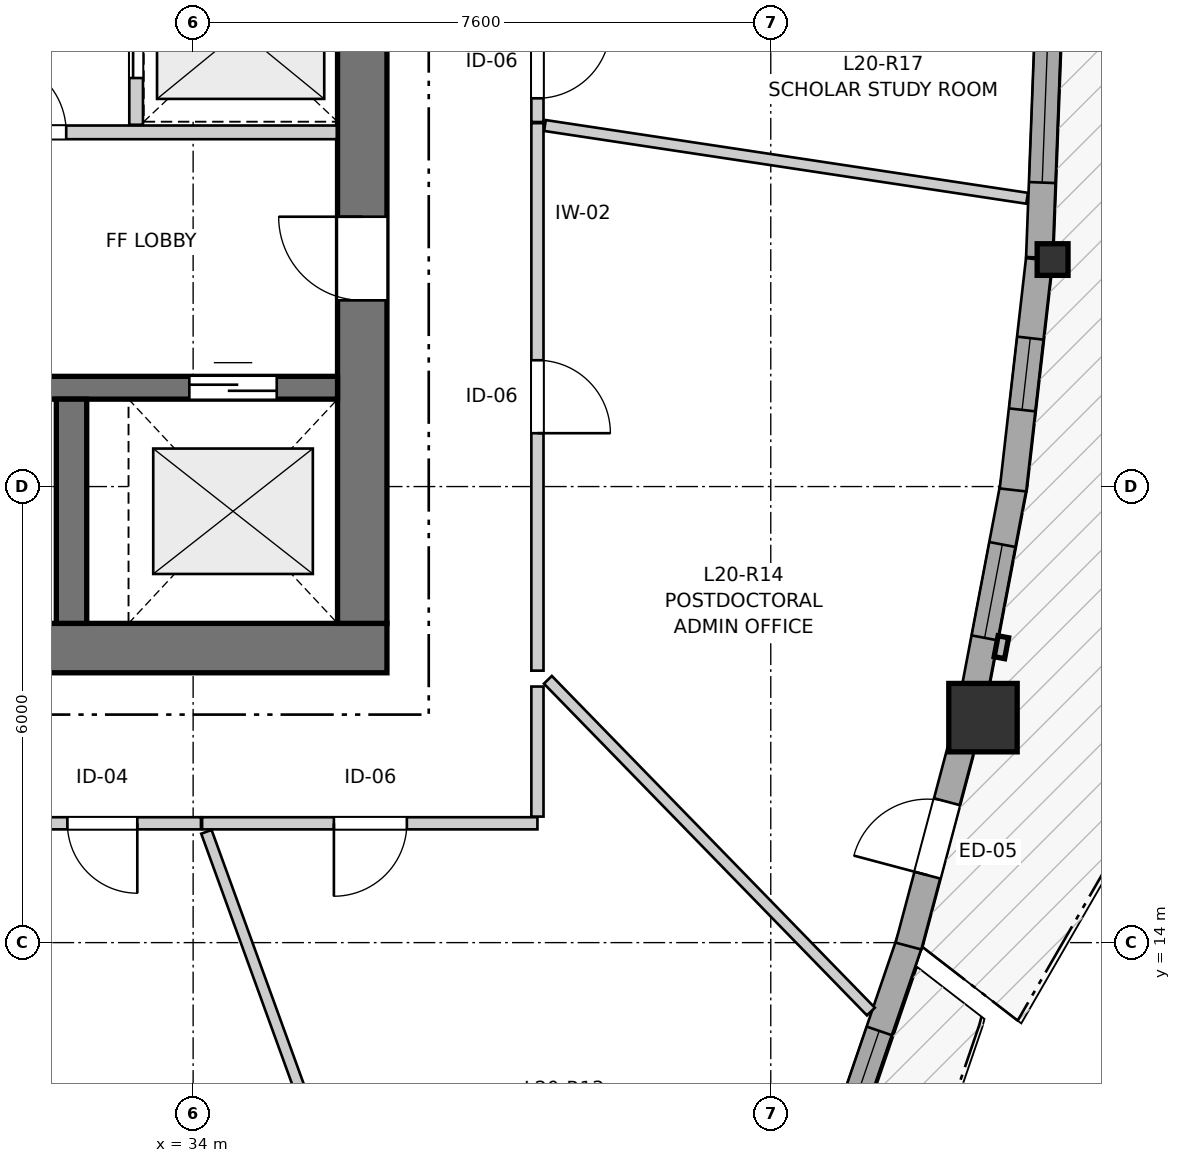
"""IFC4 building model, lengths in metres.
Left out: names, types, materials, properties, quantities, classifications, styles, units other than length and angle.
Written with IfcOpenShell. Run it as: python <this file> out.ifc"""

import sys

from ifc_helpers import new_model, si_unit, direction, frame, frame_2d, origin, origin_2d, place, context, subcontext, project, spatial, rectangle, i_section, extrude, source, transform, mapped, element, fill, save


model = new_model("IFC4")
c1 = context("Model", 3, precision=1e-05, world=origin(), true_north=direction((0.0, 1.0)))
c2 = subcontext(c1, "Body", "Model", "MODEL_VIEW")
j1 = project(units=[si_unit("LENGTHUNIT", "METRE"), si_unit("PLANEANGLEUNIT", "RADIAN")], contexts=[c1])
p1 = place(None, origin())
s1 = spatial("IfcSite", under=j1, at=p1, CompositionType="ELEMENT")
p2 = place(p1, origin())
s2 = spatial("IfcBuilding", under=s1, at=p2, CompositionType="ELEMENT")
p3 = place(p2, frame((0.0, 0.0, 70.4)))
s3 = spatial("IfcBuildingStorey", under=s2, at=p3, CompositionType="ELEMENT", Elevation=70.4)
p4 = place(p3, frame((24.15, 17.875, 0.0), z_axis=(0.0, 0.0, 1.0), x_axis=(1.0, 0.0, 0.0)))
e1 = element("IfcWall", 1, at=p4, inside=s3, PredefinedType="SHEAR", context=c2, shape_type="SweptSolid", body=[
    extrude(rectangle(XDim=12.4, YDim=0.65, at=frame_2d((6.2, 0.0))), origin(), (0.0, 0.0, 1.0), 2.95),
])
p5 = place(p3, frame((36.225, 18.2, 0.0), z_axis=(0.0, 0.0, 1.0), x_axis=(0.0, 1.0, 0.0)))
e2 = element("IfcWall", 2, at=p5, inside=s3, PredefinedType="SHEAR", context=c2, shape_type="SweptSolid", body=[
    extrude(rectangle(XDim=15.6, YDim=0.65, at=frame_2d((7.8, 0.0))), origin(), (0.0, 0.0, 1.0), 2.95),
])
p6 = place(p5, frame((4.25, 0.0, 0.0)))
e3 = element("IfcOpeningElement", 3, at=p6, cuts=e2, PredefinedType="OPENING", context=c2, shape_type="SweptSolid", body=[
    extrude(rectangle(XDim=1.1, YDim=2.15, at=frame_2d((0.55, 1.075))), frame((0.0, 0.335, 0.0), z_axis=(0.0, -1.0, 0.0), x_axis=(1.0, 0.0, 0.0)), (0.0, 0.0, 1.0), 0.67),
])
p7 = place(p5, frame((10.25, 0.0, 0.0)))
e4 = element("IfcOpeningElement", 4, at=p7, cuts=e2, PredefinedType="OPENING", context=c2, shape_type="SweptSolid", body=[
    extrude(rectangle(XDim=1.1, YDim=2.15, at=frame_2d((0.55, 1.075))), frame((0.0, 0.335, 0.0), z_axis=(0.0, -1.0, 0.0), x_axis=(1.0, 0.0, 0.0)), (0.0, 0.0, 1.0), 0.67),
])
p8 = place(p3, frame((24.8, 21.3, 0.0), z_axis=(0.0, 0.0, 1.0), x_axis=(1.0, 0.0, 0.0)))
e5 = element("IfcWall", 5, at=p8, inside=s3, PredefinedType="SHEAR", context=c2, shape_type="SweptSolid", body=[
    extrude(rectangle(XDim=11.1, YDim=0.3, at=frame_2d((5.55, 0.0))), origin(), (0.0, 0.0, 1.0), 2.95),
])
p9 = place(p8, frame((6.22, 0.0, 0.0)))
e6 = element("IfcOpeningElement", 6, at=p9, cuts=e5, PredefinedType="OPENING", context=c2, shape_type="SweptSolid", body=[
    extrude(rectangle(XDim=0.98, YDim=2.15, at=frame_2d((0.49, 1.075))), frame((0.0, 0.16, 0.0), z_axis=(0.0, -1.0, 0.0), x_axis=(1.0, 0.0, 0.0)), (0.0, 0.0, 1.0), 0.32),
])
p10 = place(p8, frame((9.15, 0.0, 0.0)))
e7 = element("IfcOpeningElement", 7, at=p10, cuts=e5, PredefinedType="OPENING", context=c2, shape_type="SweptSolid", body=[
    extrude(rectangle(XDim=1.15, YDim=2.15, at=frame_2d((0.575, 1.075))), frame((0.0, 0.16, 0.0), z_axis=(0.0, -1.0, 0.0), x_axis=(1.0, 0.0, 0.0)), (0.0, 0.0, 1.0), 0.32),
])
p11 = place(p3, frame((32.4, 18.2, 0.0), z_axis=(0.0, 0.0, 1.0), x_axis=(0.0, 1.0, 0.0)))
e8 = element("IfcWall", 8, at=p11, inside=s3, PredefinedType="SHEAR", context=c2, shape_type="SweptSolid", body=[
    extrude(rectangle(XDim=2.95, YDim=0.4, at=frame_2d((1.475, 0.0))), origin(), (0.0, 0.0, 1.0), 2.95),
])
m1 = source(origin(), c2, "Body", "SweptSolid", [
    extrude(rectangle(XDim=0.9, YDim=0.9, at=origin_2d()), origin(), (0.0, 0.0, 1.0), 2.95),
])
p12 = place(p3, frame((44.392, 16.96, 0.0), z_axis=(0.0, 0.0, 1.0), x_axis=(1.0, 0.0, 0.0)))
e9 = element("IfcColumn", 9, at=p12, inside=s3, PredefinedType="COLUMN", context=c2, shape_type="MappedRepresentation", body=[
    mapped(m1, transform((0.0, 0.0, 0.0), x_axis=(1.0, 0.0, 0.0), y_axis=(0.0, 1.0, 0.0), z_axis=(0.0, 0.0, 1.0), scale=1.0)),
])
m2 = source(origin(), c2, "Body", "SweptSolid", [
    extrude(i_section(OverallWidth=0.406, OverallDepth=0.416, WebThickness=0.027, FlangeThickness=0.044, FilletRadius=0.015, at=origin_2d()), origin(), (0.0, 0.0, 1.0), 2.95),
])
p13 = place(p3, frame((45.308, 22.987, 0.0), z_axis=(0.0, 0.0, 1.0), x_axis=(1.0, 0.0, 0.0)))
e10 = element("IfcColumn", 10, at=p13, inside=s3, PredefinedType="PILASTER", context=c2, shape_type="MappedRepresentation", body=[
    mapped(m2, transform((0.0, 0.0, 0.0), x_axis=(1.0, 0.0, 0.0), y_axis=(0.0, 1.0, 0.0), z_axis=(0.0, 0.0, 1.0), scale=1.0)),
])
p14 = place(p3, frame((42.401, 11.009, 0.0), z_axis=(0.0, 0.0, 1.0), x_axis=(0.323605065536, 0.946192243447, 0.0)))
e11 = element("IfcWall", 11, at=p14, inside=s3, PredefinedType="SOLIDWALL", context=c2, shape_type="SweptSolid", body=[
    extrude(rectangle(XDim=3.203, YDim=0.35, at=frame_2d((1.601, 0.0))), origin(), (0.0, 0.0, 1.0), 2.48),
])
p15 = place(p14, frame((0.334, 0.0, 0.82)))
e12 = element("IfcOpeningElement", 12, at=p15, cuts=e11, PredefinedType="OPENING", context=c2, shape_type="SweptSolid", body=[
    extrude(rectangle(XDim=1.6, YDim=1.35, at=frame_2d((0.8, 0.675))), frame((0.0, 0.185, 0.0), z_axis=(0.0, -1.0, 0.0), x_axis=(1.0, 0.0, 0.0)), (0.0, 0.0, 1.0), 0.37),
])
p16 = place(p3, frame((43.412, 13.955, 0.0), z_axis=(0.0, 0.0, 1.0), x_axis=(0.257050841376, 0.966397881283, 0.0)))
e13 = element("IfcWall", 13, at=p16, inside=s3, PredefinedType="SOLIDWALL", context=c2, shape_type="SweptSolid", body=[
    extrude(rectangle(XDim=2.931, YDim=0.35, at=frame_2d((1.465, 0.0))), origin(), (0.0, 0.0, 1.0), 2.48),
])
p17 = place(p16, frame((0.966, 0.0, 0.0)))
e14 = element("IfcOpeningElement", 14, at=p17, cuts=e13, PredefinedType="OPENING", context=c2, shape_type="SweptSolid", body=[
    extrude(rectangle(XDim=1.0, YDim=2.1, at=frame_2d((0.5, 1.05))), frame((0.0, 0.185, 0.0), z_axis=(0.0, -1.0, 0.0), x_axis=(1.0, 0.0, 0.0)), (0.0, 0.0, 1.0), 0.37),
])
p18 = place(p3, frame((44.262, 17.214, 0.0), z_axis=(0.0, 0.0, 1.0), x_axis=(0.18665246466, 0.982426006087, 0.0)))
e15 = element("IfcWall", 15, at=p18, inside=s3, PredefinedType="SOLIDWALL", context=c2, shape_type="SweptSolid", body=[
    extrude(rectangle(XDim=2.88, YDim=0.35, at=frame_2d((1.44, 0.0))), origin(), (0.0, 0.0, 1.0), 2.48),
])
p19 = place(p18, frame((0.81, 0.0, 0.82)))
e16 = element("IfcOpeningElement", 16, at=p19, cuts=e15, PredefinedType="OPENING", context=c2, shape_type="SweptSolid", body=[
    extrude(rectangle(XDim=1.25, YDim=1.35, at=frame_2d((0.625, 0.675))), frame((0.0, 0.185, 0.0), z_axis=(0.0, -1.0, 0.0), x_axis=(1.0, 0.0, 0.0)), (0.0, 0.0, 1.0), 0.37),
])
p20 = place(p3, frame((44.787, 19.955, 0.0), z_axis=(0.0, 0.0, 1.0), x_axis=(0.113232876367, 0.993568475602, 0.0)))
e17 = element("IfcWall", 17, at=p20, inside=s3, PredefinedType="SOLIDWALL", context=c2, shape_type="SweptSolid", body=[
    extrude(rectangle(XDim=3.051, YDim=0.35, at=frame_2d((1.525, 0.0))), origin(), (0.0, 0.0, 1.0), 2.48),
])
p21 = place(p20, frame((1.06, 0.0, 0.82)))
e18 = element("IfcOpeningElement", 18, at=p21, cuts=e17, PredefinedType="OPENING", context=c2, shape_type="SweptSolid", body=[
    extrude(rectangle(XDim=0.95, YDim=1.35, at=frame_2d((0.475, 0.675))), frame((0.0, 0.185, 0.0), z_axis=(0.0, -1.0, 0.0), x_axis=(1.0, 0.0, 0.0)), (0.0, 0.0, 1.0), 0.37),
])
p22 = place(p3, frame((45.134, 23.013, 0.0), z_axis=(0.0, 0.0, 1.0), x_axis=(0.037984969205, 0.999278310639, 0.0)))
e19 = element("IfcWall", 19, at=p22, inside=s3, PredefinedType="SOLIDWALL", context=c2, shape_type="SweptSolid", body=[
    extrude(rectangle(XDim=3.034, YDim=0.35, at=frame_2d((1.517, 0.0))), origin(), (0.0, 0.0, 1.0), 2.48),
])
p23 = place(p22, frame((0.987, 0.0, 0.82)))
e20 = element("IfcOpeningElement", 20, at=p23, cuts=e19, PredefinedType="OPENING", context=c2, shape_type="SweptSolid", body=[
    extrude(rectangle(XDim=1.75, YDim=1.3, at=frame_2d((0.875, 0.65))), frame((0.0, 0.185, 0.0), z_axis=(0.0, -1.0, 0.0), x_axis=(1.0, 0.0, 0.0)), (0.0, 0.0, 1.0), 0.37),
])
p24 = place(p3, frame((30.67, 24.66, 0.0), z_axis=(0.0, 0.0, 1.0), x_axis=(1.0, 0.0, 0.0)))
e21 = element("IfcWall", 21, at=p24, inside=s3, PredefinedType="PARTITIONING", context=c2, shape_type="SweptSolid", body=[
    extrude(rectangle(XDim=5.22, YDim=0.18, at=frame_2d((2.61, 0.0))), origin(), (0.0, 0.0, 1.0), 2.95),
])
p25 = place(p24, frame((0.68, 0.0, 0.0)))
e22 = element("IfcOpeningElement", 22, at=p25, cuts=e21, PredefinedType="OPENING", context=c2, shape_type="SweptSolid", body=[
    extrude(rectangle(XDim=0.98, YDim=2.15, at=frame_2d((0.49, 1.075))), frame((0.0, 0.1, 0.0), z_axis=(0.0, -1.0, 0.0), x_axis=(1.0, 0.0, 0.0)), (0.0, 0.0, 1.0), 0.2),
])
p26 = place(p3, frame((33.25, 24.76, 0.0), z_axis=(0.0, 0.0, 1.0), x_axis=(0.0, 1.0, 0.0)))
e23 = element("IfcWall", 23, at=p26, inside=s3, PredefinedType="PARTITIONING", context=c2, shape_type="SweptSolid", body=[
    extrude(rectangle(XDim=2.48, YDim=0.18, at=frame_2d((1.24, 0.0))), origin(), (0.0, 0.0, 1.0), 2.95),
])
p27 = place(p26, frame((0.615, 0.0, 0.0)))
e24 = element("IfcOpeningElement", 24, at=p27, cuts=e23, PredefinedType="OPENING", context=c2, shape_type="SweptSolid", body=[
    extrude(rectangle(XDim=1.25, YDim=2.15, at=frame_2d((0.625, 1.075))), frame((0.0, 0.1, 0.0), z_axis=(0.0, -1.0, 0.0), x_axis=(1.0, 0.0, 0.0)), (0.0, 0.0, 1.0), 0.2),
])
p28 = place(p3, frame((38.53, 24.781, 0.0), z_axis=(0.0, 0.0, 1.0), x_axis=(0.0, -1.0, 0.0)))
e25 = element("IfcWall", 25, at=p28, inside=s3, PredefinedType="PARTITIONING", context=c2, shape_type="SweptSolid", body=[
    extrude(rectangle(XDim=7.203, YDim=0.16, at=frame_2d((3.602, 0.0))), origin(), (0.0, 0.0, 1.0), 2.95),
])
p29 = place(p28, frame((3.119, 0.0, 0.0)))
e26 = element("IfcOpeningElement", 26, at=p29, cuts=e25, PredefinedType="OPENING", context=c2, shape_type="SweptSolid", body=[
    extrude(rectangle(XDim=0.96, YDim=2.1, at=frame_2d((0.48, 1.05))), frame((0.0, 0.09, 0.0), z_axis=(0.0, -1.0, 0.0), x_axis=(1.0, 0.0, 0.0)), (0.0, 0.0, 1.0), 0.18),
])
p30 = place(p3, frame((38.53, 15.57, 0.0), z_axis=(0.0, 0.0, 1.0), x_axis=(-1.0, 0.0, 0.0)))
e27 = element("IfcWall", 27, at=p30, inside=s3, PredefinedType="PARTITIONING", context=c2, shape_type="SweptSolid", body=[
    extrude(rectangle(XDim=4.412, YDim=0.16, at=frame_2d((2.206, 0.0))), origin(), (0.0, 0.0, 1.0), 2.95),
])
p31 = place(p30, frame((1.718, 0.0, 0.0)))
e28 = element("IfcOpeningElement", 28, at=p31, cuts=e27, PredefinedType="OPENING", context=c2, shape_type="SweptSolid", body=[
    extrude(rectangle(XDim=0.96, YDim=2.1, at=frame_2d((0.48, 1.05))), frame((0.0, 0.09, 0.0), z_axis=(0.0, -1.0, 0.0), x_axis=(1.0, 0.0, 0.0)), (0.0, 0.0, 1.0), 0.18),
])
p32 = place(p3, frame((34.103, 15.57, 0.0), z_axis=(0.0, 0.0, 1.0), x_axis=(-1.0, 0.0, 0.0)))
e29 = element("IfcWall", 29, at=p32, inside=s3, PredefinedType="PARTITIONING", context=c2, shape_type="SweptSolid", body=[
    extrude(rectangle(XDim=2.596, YDim=0.16, at=frame_2d((1.298, 0.0))), origin(), (0.0, 0.0, 1.0), 2.95),
])
p33 = place(p32, frame((0.837, 0.0, 0.0)))
e30 = element("IfcOpeningElement", 30, at=p33, cuts=e29, PredefinedType="OPENING", context=c2, shape_type="SweptSolid", body=[
    extrude(rectangle(XDim=0.92, YDim=2.1, at=frame_2d((0.46, 1.05))), frame((0.0, 0.09, 0.0), z_axis=(0.0, -1.0, 0.0), x_axis=(1.0, 0.0, 0.0)), (0.0, 0.0, 1.0), 0.18),
])
p34 = place(p3, frame((38.53, 26.381, 0.0), z_axis=(0.0, 0.0, 1.0), x_axis=(0.0, -1.0, 0.0)))
e31 = element("IfcWall", 31, at=p34, inside=s3, PredefinedType="PARTITIONING", context=c2, shape_type="SweptSolid", body=[
    extrude(rectangle(XDim=1.585, YDim=0.16, at=frame_2d((0.792, 0.0))), origin(), (0.0, 0.0, 1.0), 2.95),
])
p35 = place(p34, frame((0.313, 0.0, 0.0)))
e32 = element("IfcOpeningElement", 32, at=p35, cuts=e31, PredefinedType="OPENING", context=c2, shape_type="SweptSolid", body=[
    extrude(rectangle(XDim=0.96, YDim=2.1, at=frame_2d((0.48, 1.05))), frame((0.0, 0.09, 0.0), z_axis=(0.0, -1.0, 0.0), x_axis=(1.0, 0.0, 0.0)), (0.0, 0.0, 1.0), 0.18),
])
p36 = place(p3, frame((34.175, 15.458, 0.0), z_axis=(0.0, 0.0, 1.0), x_axis=(0.341079223998, -0.940034554129, 0.0)))
e33 = element("IfcWall", 33, at=p36, inside=s3, PredefinedType="PARTITIONING", context=c2, shape_type="SweptSolid", body=[
    extrude(rectangle(XDim=10.484, YDim=0.145, at=frame_2d((5.242, 0.0))), origin(), (0.0, 0.0, 1.0), 2.95),
])
p37 = place(p3, frame((38.629, 24.75, 0.0), z_axis=(0.0, 0.0, 1.0), x_axis=(0.988806184902, -0.149205659073, 0.0)))
e34 = element("IfcWall", 34, at=p37, inside=s3, PredefinedType="PARTITIONING", context=c2, shape_type="SweptSolid", body=[
    extrude(rectangle(XDim=6.416, YDim=0.145, at=frame_2d((3.208, 0.0))), origin(), (0.0, 0.0, 1.0), 2.95),
])
p38 = place(p3, frame((38.667, 17.458, 0.0), z_axis=(0.0, 0.0, 1.0), x_axis=(0.697626427609, -0.716461699954, 0.0)))
e35 = element("IfcWall", 35, at=p38, inside=s3, PredefinedType="PARTITIONING", context=c2, shape_type="SweptSolid", body=[
    extrude(rectangle(XDim=6.092, YDim=0.145, at=frame_2d((3.046, 0.0))), origin(), (0.0, 0.0, 1.0), 2.95),
])
p39 = place(p3, frame((38.53, 15.658, 0.0), z_axis=(0.0, 0.0, 1.0), x_axis=(0.0, 1.0, 0.0)))
e36 = element("IfcWall", 36, at=p39, inside=s3, PredefinedType="PARTITIONING", context=c2, shape_type="SweptSolid", body=[
    extrude(rectangle(XDim=1.711, YDim=0.16, at=frame_2d((0.855, 0.0))), origin(), (0.0, 0.0, 1.0), 2.95),
])
m3 = source(origin(), c2, "Body", "SweptSolid", [
    extrude(rectangle(XDim=1.6, YDim=1.35, at=frame_2d((0.8, 0.675))), frame((0.0, 0.03, 0.0), z_axis=(0.0, -1.0, 0.0), x_axis=(1.0, 0.0, 0.0)), (0.0, 0.0, 1.0), 0.06),
])
p40 = place(p15, origin())
e37 = element("IfcWindow", 37, at=p40, inside=s3, PartitioningType="SINGLE_PANEL", PredefinedType="WINDOW", context=c2, shape_type="MappedRepresentation", body=[
    mapped(m3, transform((0.0, 0.0, 0.0), x_axis=(1.0, 0.0, 0.0), y_axis=(0.0, 1.0, 0.0), z_axis=(0.0, 0.0, 1.0), scale=1.0)),
])
fill(e12, e37)
m4 = source(origin(), c2, "Body", "SweptSolid", [
    extrude(rectangle(XDim=1.25, YDim=1.35, at=frame_2d((0.625, 0.675))), frame((0.0, 0.03, 0.0), z_axis=(0.0, -1.0, 0.0), x_axis=(1.0, 0.0, 0.0)), (0.0, 0.0, 1.0), 0.06),
])
p41 = place(p19, origin())
e38 = element("IfcWindow", 38, at=p41, inside=s3, PartitioningType="SINGLE_PANEL", PredefinedType="WINDOW", context=c2, shape_type="MappedRepresentation", body=[
    mapped(m4, transform((0.0, 0.0, 0.0), x_axis=(1.0, 0.0, 0.0), y_axis=(0.0, 1.0, 0.0), z_axis=(0.0, 0.0, 1.0), scale=1.0)),
])
fill(e16, e38)
m5 = source(origin(), c2, "Body", "SweptSolid", [
    extrude(rectangle(XDim=0.95, YDim=1.35, at=frame_2d((0.475, 0.675))), frame((0.0, 0.03, 0.0), z_axis=(0.0, -1.0, 0.0), x_axis=(1.0, 0.0, 0.0)), (0.0, 0.0, 1.0), 0.06),
])
p42 = place(p21, origin())
e39 = element("IfcWindow", 39, at=p42, inside=s3, PartitioningType="SINGLE_PANEL", PredefinedType="WINDOW", context=c2, shape_type="MappedRepresentation", body=[
    mapped(m5, transform((0.0, 0.0, 0.0), x_axis=(1.0, 0.0, 0.0), y_axis=(0.0, 1.0, 0.0), z_axis=(0.0, 0.0, 1.0), scale=1.0)),
])
fill(e18, e39)
m6 = source(origin(), c2, "Body", "SweptSolid", [
    extrude(rectangle(XDim=1.75, YDim=1.3, at=frame_2d((0.875, 0.65))), frame((0.0, 0.03, 0.0), z_axis=(0.0, -1.0, 0.0), x_axis=(1.0, 0.0, 0.0)), (0.0, 0.0, 1.0), 0.06),
])
p43 = place(p23, origin())
e40 = element("IfcWindow", 40, at=p43, inside=s3, PartitioningType="SINGLE_PANEL", PredefinedType="WINDOW", context=c2, shape_type="MappedRepresentation", body=[
    mapped(m6, transform((0.0, 0.0, 0.0), x_axis=(1.0, 0.0, 0.0), y_axis=(0.0, 1.0, 0.0), z_axis=(0.0, 0.0, 1.0), scale=1.0)),
])
fill(e20, e40)
m7 = source(origin(), c2, "Body", "SweptSolid", [
    extrude(rectangle(XDim=1.0, YDim=2.1, at=frame_2d((0.5, 1.05))), frame((0.0, 0.025, 0.0), z_axis=(0.0, -1.0, 0.0), x_axis=(1.0, 0.0, 0.0)), (0.0, 0.0, 1.0), 0.05),
])
p44 = place(p17, origin())
e41 = element("IfcDoor", 41, at=p44, inside=s3, OperationType="SINGLE_SWING_LEFT", PredefinedType="DOOR", context=c2, shape_type="MappedRepresentation", body=[
    mapped(m7, transform((0.0, 0.0, 0.0), x_axis=(1.0, 0.0, 0.0), y_axis=(0.0, 1.0, 0.0), z_axis=(0.0, 0.0, 1.0), scale=1.0)),
])
fill(e14, e41)
m8 = source(origin(), c2, "Body", "SweptSolid", [
    extrude(rectangle(XDim=1.15, YDim=2.15, at=frame_2d((0.575, 1.075))), frame((0.0, 0.025, 0.0), z_axis=(0.0, -1.0, 0.0), x_axis=(1.0, 0.0, 0.0)), (0.0, 0.0, 1.0), 0.05),
])
p45 = place(p10, origin())
e42 = element("IfcDoor", 42, at=p45, inside=s3, OperationType="DOUBLE_DOOR_SLIDING", PredefinedType="DOOR", context=c2, shape_type="MappedRepresentation", body=[
    mapped(m8, transform((0.0, 0.0, 0.0), x_axis=(1.0, 0.0, 0.0), y_axis=(0.0, 1.0, 0.0), z_axis=(0.0, 0.0, 1.0), scale=1.0)),
])
fill(e7, e42)
m9 = source(origin(), c2, "Body", "SweptSolid", [
    extrude(rectangle(XDim=1.1, YDim=2.15, at=frame_2d((0.55, 1.075))), frame((0.0, 0.025, 0.0), z_axis=(0.0, -1.0, 0.0), x_axis=(1.0, 0.0, 0.0)), (0.0, 0.0, 1.0), 0.05),
])
p46 = place(p6, origin())
e43 = element("IfcDoor", 43, at=p46, inside=s3, OperationType="SINGLE_SWING_RIGHT", PredefinedType="DOOR", context=c2, shape_type="MappedRepresentation", body=[
    mapped(m9, transform((0.0, 0.0, 0.0), x_axis=(1.0, 0.0, 0.0), y_axis=(0.0, 1.0, 0.0), z_axis=(0.0, 0.0, 1.0), scale=1.0)),
])
fill(e3, e43)
m10 = source(origin(), c2, "Body", "SweptSolid", [
    extrude(rectangle(XDim=0.98, YDim=2.15, at=frame_2d((0.49, 1.075))), frame((0.0, 0.025, 0.0), z_axis=(0.0, -1.0, 0.0), x_axis=(1.0, 0.0, 0.0)), (0.0, 0.0, 1.0), 0.05),
])
p47 = place(p25, origin())
e44 = element("IfcDoor", 44, at=p47, inside=s3, OperationType="SINGLE_SWING_LEFT", PredefinedType="DOOR", context=c2, shape_type="MappedRepresentation", body=[
    mapped(m10, transform((0.0, 0.0, 0.0), x_axis=(1.0, 0.0, 0.0), y_axis=(0.0, 1.0, 0.0), z_axis=(0.0, 0.0, 1.0), scale=1.0)),
])
fill(e22, e44)
m11 = source(origin(), c2, "Body", "SweptSolid", [
    extrude(rectangle(XDim=1.25, YDim=2.15, at=frame_2d((0.625, 1.075))), frame((0.0, 0.025, 0.0), z_axis=(0.0, -1.0, 0.0), x_axis=(1.0, 0.0, 0.0)), (0.0, 0.0, 1.0), 0.05),
])
p48 = place(p27, origin())
e45 = element("IfcDoor", 45, at=p48, inside=s3, OperationType="DOUBLE_DOOR_SLIDING", PredefinedType="DOOR", context=c2, shape_type="MappedRepresentation", body=[
    mapped(m11, transform((0.0, 0.0, 0.0), x_axis=(1.0, 0.0, 0.0), y_axis=(0.0, 1.0, 0.0), z_axis=(0.0, 0.0, 1.0), scale=1.0)),
])
fill(e24, e45)
m12 = source(origin(), c2, "Body", "SweptSolid", [
    extrude(rectangle(XDim=0.96, YDim=2.1, at=frame_2d((0.48, 1.05))), frame((0.0, 0.025, 0.0), z_axis=(0.0, -1.0, 0.0), x_axis=(1.0, 0.0, 0.0)), (0.0, 0.0, 1.0), 0.05),
])
p49 = place(p29, origin())
e46 = element("IfcDoor", 46, at=p49, inside=s3, OperationType="SINGLE_SWING_RIGHT", PredefinedType="DOOR", context=c2, shape_type="MappedRepresentation", body=[
    mapped(m12, transform((0.0, 0.0, 0.0), x_axis=(1.0, 0.0, 0.0), y_axis=(0.0, 1.0, 0.0), z_axis=(0.0, 0.0, 1.0), scale=1.0)),
])
fill(e26, e46)
p50 = place(p31, origin())
e47 = element("IfcDoor", 47, at=p50, inside=s3, OperationType="SINGLE_SWING_RIGHT", PredefinedType="DOOR", context=c2, shape_type="MappedRepresentation", body=[
    mapped(m12, transform((0.0, 0.0, 0.0), x_axis=(1.0, 0.0, 0.0), y_axis=(0.0, 1.0, 0.0), z_axis=(0.0, 0.0, 1.0), scale=1.0)),
])
fill(e28, e47)
m13 = source(origin(), c2, "Body", "SweptSolid", [
    extrude(rectangle(XDim=0.92, YDim=2.1, at=frame_2d((0.46, 1.05))), frame((0.0, 0.025, 0.0), z_axis=(0.0, -1.0, 0.0), x_axis=(1.0, 0.0, 0.0)), (0.0, 0.0, 1.0), 0.05),
])
p51 = place(p33, origin())
e48 = element("IfcDoor", 48, at=p51, inside=s3, OperationType="SINGLE_SWING_LEFT", PredefinedType="DOOR", context=c2, shape_type="MappedRepresentation", body=[
    mapped(m13, transform((0.0, 0.0, 0.0), x_axis=(1.0, 0.0, 0.0), y_axis=(0.0, 1.0, 0.0), z_axis=(0.0, 0.0, 1.0), scale=1.0)),
])
fill(e30, e48)
p52 = place(p35, origin())
e49 = element("IfcDoor", 49, at=p52, inside=s3, OperationType="SINGLE_SWING_LEFT", PredefinedType="DOOR", context=c2, shape_type="MappedRepresentation", body=[
    mapped(m12, transform((0.0, 0.0, 0.0), x_axis=(1.0, 0.0, 0.0), y_axis=(0.0, 1.0, 0.0), z_axis=(0.0, 0.0, 1.0), scale=1.0)),
])
fill(e32, e49)
save(model, sys.argv[1])
